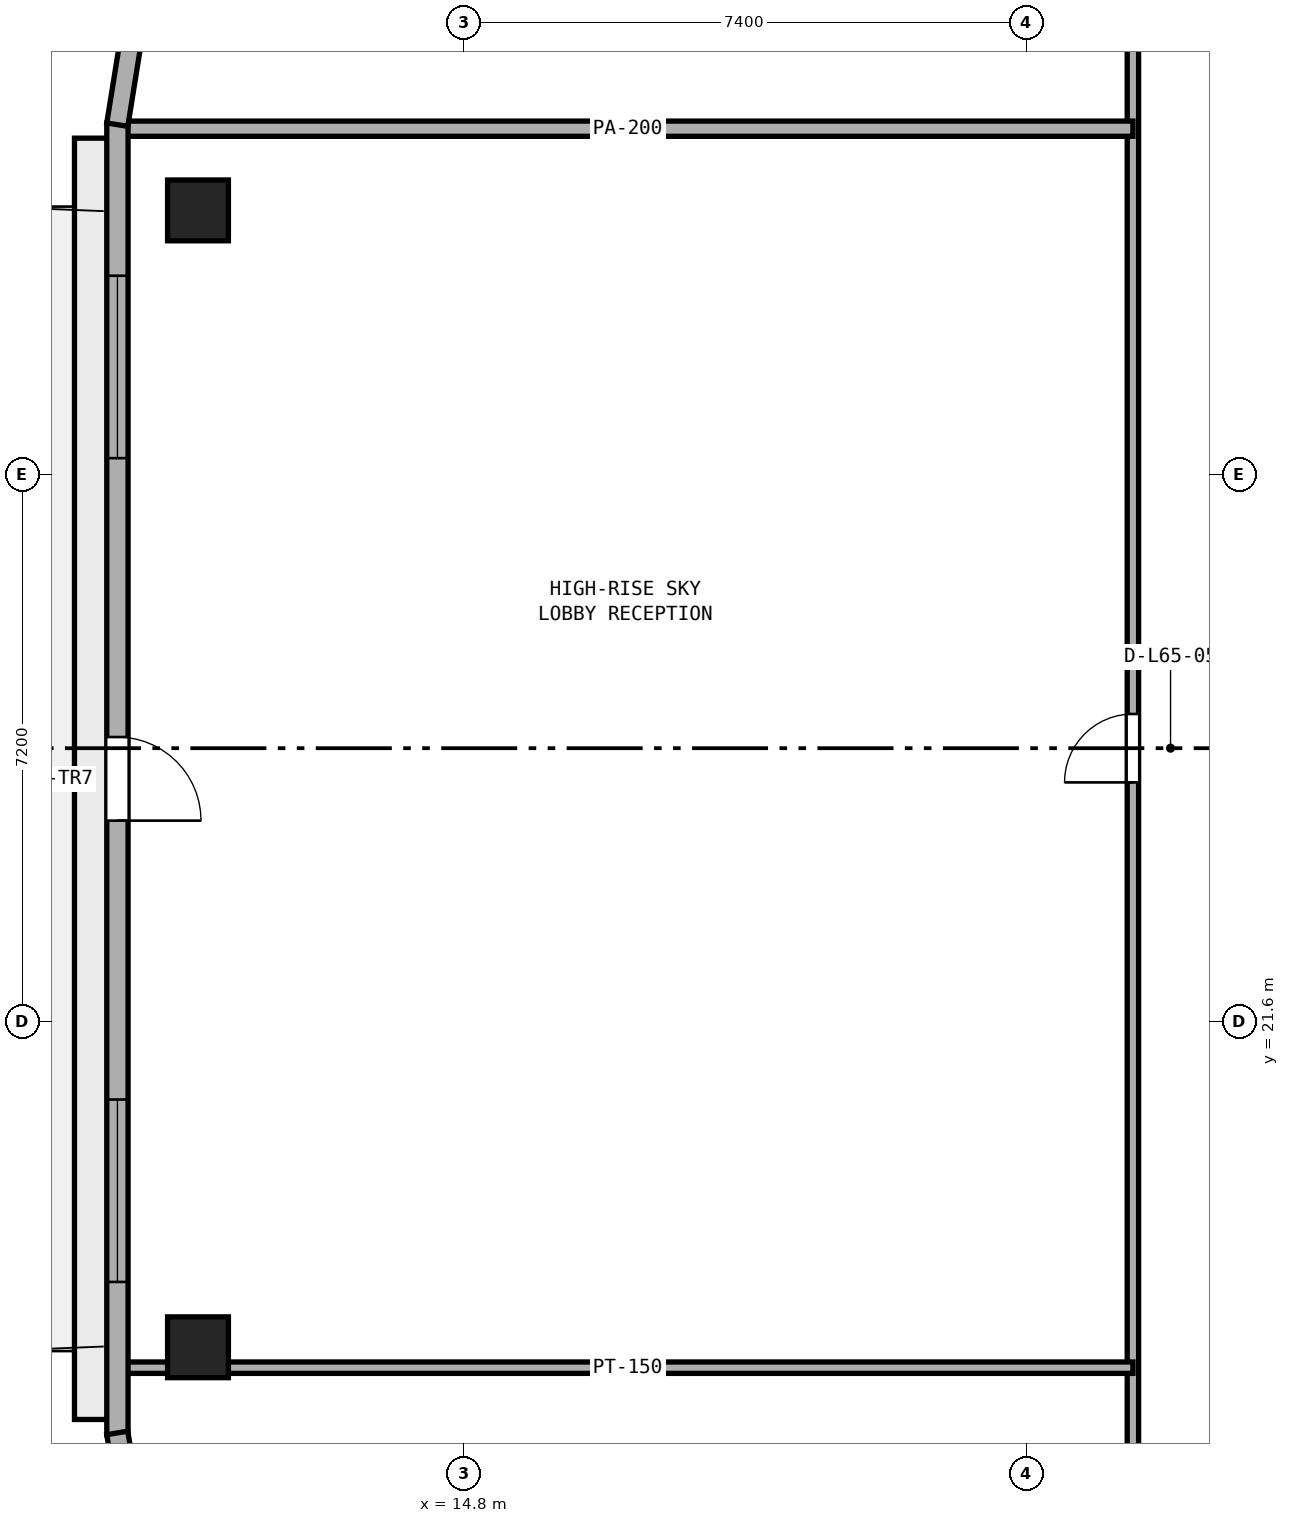
"""IFC4 building model, lengths in metres.
Left out: names, types, materials, properties, quantities, classifications, styles, units other than length and angle.
Written with IfcOpenShell. Run it as: python <this file> out.ifc"""

import sys

from ifc_helpers import new_model, si_unit, direction, frame, frame_2d, origin, origin_2d, place, context, subcontext, project, spatial, rectangle, extrude, element, fill, save


model = new_model("IFC4")
c1 = context("Model", 3, precision=1e-05, world=origin(), true_north=direction((0.0, 1.0)))
c2 = subcontext(c1, "Body", "Model", "MODEL_VIEW")
j1 = project(units=[si_unit("LENGTHUNIT", "METRE"), si_unit("PLANEANGLEUNIT", "RADIAN")], contexts=[c1])
p1 = place(None, origin())
s1 = spatial("IfcSite", under=j1, at=p1, CompositionType="ELEMENT")
p2 = place(p1, origin())
s2 = spatial("IfcBuilding", under=s1, at=p2, CompositionType="ELEMENT")
p3 = place(p2, frame((0.0, 0.0, 255.4)))
s3 = spatial("IfcBuildingStorey", under=s2, at=p3, CompositionType="ELEMENT", Elevation=255.4)
for number, where, z_axis, x_axis in (
    (1, (11.3, 32.275, 0.0), (0.0, 0.0, 1.0), (1.0, 0.0, 0.0)),
    (2, (11.3, 17.319, 0.0), (0.0, 0.0, 1.0), (1.0, 0.0, 0.0)),
):
    element("IfcColumn", number, at=place(p3, frame(where, z_axis=z_axis, x_axis=x_axis)), inside=s3, PredefinedType="COLUMN", context=c2, shape_type="SweptSolid", body=[
        extrude(rectangle(XDim=0.8, YDim=0.8, at=origin_2d()), origin(), (0.0, 0.0, 1.0), 3.8),
    ])
p4 = place(p3, frame((23.6, 15.2, 0.0), z_axis=(0.0, 0.0, 1.0), x_axis=(0.0, 1.0, 0.0)))
e3 = element("IfcWall", 3, at=p4, inside=s3, PredefinedType="PARTITIONING", context=c2, shape_type="SweptSolid", body=[
    extrude(rectangle(XDim=20.0, YDim=0.15, at=frame_2d((10.0, 0.0))), origin(), (0.0, 0.0, 1.0), 3.51),
])
p5 = place(p4, frame((9.55, 0.0, 0.0)))
e4 = element("IfcOpeningElement", 4, at=p5, cuts=e3, PredefinedType="OPENING", context=c2, shape_type="SweptSolid", body=[
    extrude(rectangle(XDim=0.9, YDim=2.1, at=frame_2d((0.45, 1.05))), frame((0.0, 0.085, 0.0), z_axis=(0.0, -1.0, 0.0), x_axis=(1.0, 0.0, 0.0)), (0.0, 0.0, 1.0), 0.17),
])
p6 = place(p3, frame((10.305, 17.05, 0.0), z_axis=(0.0, 0.0, 1.0), x_axis=(1.0, 0.0, 0.0)))
e5 = element("IfcWall", 5, at=p6, inside=s3, PredefinedType="PARTITIONING", context=c2, shape_type="SweptSolid", body=[
    extrude(rectangle(XDim=13.295, YDim=0.15, at=frame_2d((6.647, 0.0))), origin(), (0.0, 0.0, 1.0), 3.51),
])
p7 = place(p3, frame((10.305, 33.35, 0.0), z_axis=(0.0, 0.0, 1.0), x_axis=(1.0, 0.0, 0.0)))
e6 = element("IfcWall", 6, at=p7, inside=s3, PredefinedType="PARTITIONING", context=c2, shape_type="SweptSolid", body=[
    extrude(rectangle(XDim=13.295, YDim=0.2, at=frame_2d((6.647, 0.0))), origin(), (0.0, 0.0, 1.0), 3.51),
])
p8 = place(p3, frame((10.24, 33.425, 0.0), z_axis=(0.0, 0.0, 1.0), x_axis=(0.0, -1.0, 0.0)))
e7 = element("IfcWall", 7, at=p8, inside=s3, PredefinedType="STANDARD", context=c2, shape_type="SweptSolid", body=[
    extrude(rectangle(XDim=17.257, YDim=0.28, at=frame_2d((8.628, 0.0))), origin(), (0.0, 0.0, 1.0), 3.51),
])
p9 = place(p8, frame((8.078, 0.0, 0.0)))
e8 = element("IfcOpeningElement", 8, at=p9, cuts=e7, PredefinedType="OPENING", context=c2, shape_type="SweptSolid", body=[
    extrude(rectangle(XDim=1.1, YDim=2.2, at=frame_2d((0.55, 1.1))), frame((0.0, 0.15, 0.0), z_axis=(0.0, -1.0, 0.0), x_axis=(1.0, 0.0, 0.0)), (0.0, 0.0, 1.0), 0.3),
])
p10 = place(p8, frame((2.01, 0.0, 0.9)))
e9 = element("IfcOpeningElement", 9, at=p10, cuts=e7, PredefinedType="OPENING", context=c2, shape_type="SweptSolid", body=[
    extrude(rectangle(XDim=2.4, YDim=1.75, at=frame_2d((1.2, 0.875))), frame((0.0, 0.15, 0.0), z_axis=(0.0, -1.0, 0.0), x_axis=(1.0, 0.0, 0.0)), (0.0, 0.0, 1.0), 0.3),
])
p11 = place(p8, frame((12.847, 0.0, 0.9)))
e10 = element("IfcOpeningElement", 10, at=p11, cuts=e7, PredefinedType="OPENING", context=c2, shape_type="SweptSolid", body=[
    extrude(rectangle(XDim=2.4, YDim=1.75, at=frame_2d((1.2, 0.875))), frame((0.0, 0.15, 0.0), z_axis=(0.0, -1.0, 0.0), x_axis=(1.0, 0.0, 0.0)), (0.0, 0.0, 1.0), 0.3),
])
p12 = place(p3, frame((10.445, 34.688, 0.0), z_axis=(0.0, 0.0, 1.0), x_axis=(-0.158524605336, -0.987355027081, 0.0)))
e11 = element("IfcWall", 11, at=p12, inside=s3, PredefinedType="STANDARD", context=c2, shape_type="SweptSolid", body=[
    extrude(rectangle(XDim=1.301, YDim=0.28, at=frame_2d((0.651, 0.0))), origin(), (0.0, 0.0, 1.0), 3.51),
])
p13 = place(p3, frame((10.238, 16.192, 0.0), z_axis=(0.0, 0.0, 1.0), x_axis=(0.164604311367, -0.986359681191, 0.0)))
e12 = element("IfcWall", 12, at=p13, inside=s3, PredefinedType="STANDARD", context=c2, shape_type="SweptSolid", body=[
    extrude(rectangle(XDim=1.35, YDim=0.28, at=frame_2d((0.675, 0.0))), origin(), (0.0, 0.0, 1.0), 3.51),
])
p14 = place(p5, origin())
e13 = element("IfcDoor", 13, at=p14, inside=s3, OperationType="SINGLE_SWING_LEFT", PredefinedType="DOOR", context=c2, shape_type="SweptSolid", body=[
    extrude(rectangle(XDim=0.9, YDim=2.1, at=frame_2d((0.45, 1.05))), frame((0.0, 0.025, 0.0), z_axis=(0.0, -1.0, 0.0), x_axis=(1.0, 0.0, 0.0)), (0.0, 0.0, 1.0), 0.05),
])
fill(e4, e13)
p15 = place(p9, origin())
e14 = element("IfcDoor", 14, at=p15, inside=s3, OperationType="SINGLE_SWING_RIGHT", PredefinedType="DOOR", context=c2, shape_type="SweptSolid", body=[
    extrude(rectangle(XDim=1.1, YDim=2.2, at=frame_2d((0.55, 1.1))), frame((0.0, 0.025, 0.0), z_axis=(0.0, -1.0, 0.0), x_axis=(1.0, 0.0, 0.0)), (0.0, 0.0, 1.0), 0.05),
])
fill(e8, e14)
p16 = place(p10, origin())
e15 = element("IfcWindow", 15, at=p16, inside=s3, PartitioningType="SINGLE_PANEL", PredefinedType="WINDOW", context=c2, shape_type="SweptSolid", body=[
    extrude(rectangle(XDim=2.4, YDim=1.75, at=frame_2d((1.2, 0.875))), frame((0.0, 0.03, 0.0), z_axis=(0.0, -1.0, 0.0), x_axis=(1.0, 0.0, 0.0)), (0.0, 0.0, 1.0), 0.06),
])
fill(e9, e15)
p17 = place(p11, origin())
e16 = element("IfcWindow", 16, at=p17, inside=s3, PartitioningType="SINGLE_PANEL", PredefinedType="WINDOW", context=c2, shape_type="SweptSolid", body=[
    extrude(rectangle(XDim=2.4, YDim=1.75, at=frame_2d((1.2, 0.875))), frame((0.0, 0.03, 0.0), z_axis=(0.0, -1.0, 0.0), x_axis=(1.0, 0.0, 0.0)), (0.0, 0.0, 1.0), 0.06),
])
fill(e10, e16)
save(model, sys.argv[1])
